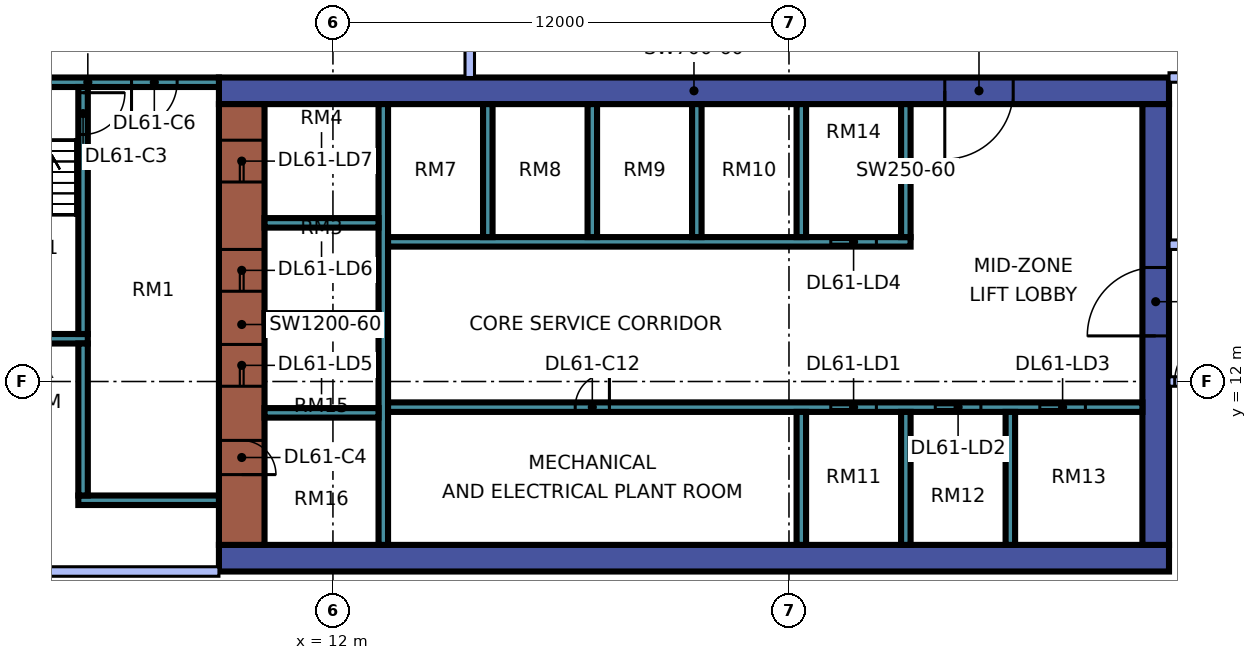
"""IFC4 building model, lengths in metres.
Left out: names, types, materials, properties, quantities, classifications, styles, units other than length and angle.
Written with IfcOpenShell. Run it as: python <this file> out.ifc"""

import sys

from ifc_helpers import new_model, si_unit, direction, frame, frame_2d, origin, place, context, subcontext, project, spatial, rectangle, extrude, element, fill, save


model = new_model("IFC4")
c1 = context("Model", 3, precision=1e-05, world=origin(), true_north=direction((0.0, 1.0)))
c2 = subcontext(c1, "Body", "Model", "MODEL_VIEW")
j1 = project(units=[si_unit("LENGTHUNIT", "METRE"), si_unit("PLANEANGLEUNIT", "RADIAN")], contexts=[c1])
p1 = place(None, origin())
s1 = spatial("IfcSite", under=j1, at=p1, CompositionType="ELEMENT")
p2 = place(p1, origin())
s2 = spatial("IfcBuilding", under=s1, at=p2, CompositionType="ELEMENT")
p3 = place(p2, frame((0.0, 0.0, 256.65)))
s3 = spatial("IfcBuildingStorey", under=s2, at=p3, CompositionType="ELEMENT", Elevation=256.65)
p4 = place(p3, frame((9.0, 7.35, 0.0), z_axis=(0.0, 0.0, 1.0), x_axis=(1.0, 0.0, 0.0)))
e1 = element("IfcWall", 1, at=p4, inside=s3, PredefinedType="SHEAR", context=c2, shape_type="SweptSolid", body=[
    extrude(rectangle(XDim=25.0, YDim=0.7, at=frame_2d((12.5, 0.0))), origin(), (0.0, 0.0, 1.0), 5.5),
])
p5 = place(p3, frame((9.0, 19.65, 0.0), z_axis=(0.0, 0.0, 1.0), x_axis=(1.0, 0.0, 0.0)))
e2 = element("IfcWall", 2, at=p5, inside=s3, PredefinedType="SHEAR", context=c2, shape_type="SweptSolid", body=[
    extrude(rectangle(XDim=25.0, YDim=0.7, at=frame_2d((12.5, 0.0))), origin(), (0.0, 0.0, 1.0), 5.5),
])
p6 = place(p5, frame((19.1, 0.0, 0.0)))
e3 = element("IfcOpeningElement", 3, at=p6, cuts=e2, PredefinedType="OPENING", context=c2, shape_type="SweptSolid", body=[
    extrude(rectangle(XDim=1.8, YDim=2.4, at=frame_2d((0.9, 1.2))), frame((0.0, 0.36, 0.0), z_axis=(0.0, -1.0, 0.0), x_axis=(1.0, 0.0, 0.0)), (0.0, 0.0, 1.0), 0.72),
])
p7 = place(p3, frame((9.6, 7.7, 0.0), z_axis=(0.0, 0.0, 1.0), x_axis=(0.0, 1.0, 0.0)))
e4 = element("IfcWall", 4, at=p7, inside=s3, PredefinedType="SHEAR", context=c2, shape_type="SweptSolid", body=[
    extrude(rectangle(XDim=11.6, YDim=1.2, at=frame_2d((5.8, 0.0))), origin(), (0.0, 0.0, 1.0), 5.5),
])
p8 = place(p7, frame((4.175, 0.0, 0.0)))
e5 = element("IfcOpeningElement", 5, at=p8, cuts=e4, PredefinedType="OPENING", context=c2, shape_type="SweptSolid", body=[
    extrude(rectangle(XDim=1.1, YDim=2.2, at=frame_2d((0.55, 1.1))), frame((0.0, 0.61, 0.0), z_axis=(0.0, -1.0, 0.0), x_axis=(1.0, 0.0, 0.0)), (0.0, 0.0, 1.0), 1.22),
])
p9 = place(p7, frame((6.675, 0.0, 0.0)))
e6 = element("IfcOpeningElement", 6, at=p9, cuts=e4, PredefinedType="OPENING", context=c2, shape_type="SweptSolid", body=[
    extrude(rectangle(XDim=1.1, YDim=2.2, at=frame_2d((0.55, 1.1))), frame((0.0, 0.61, 0.0), z_axis=(0.0, -1.0, 0.0), x_axis=(1.0, 0.0, 0.0)), (0.0, 0.0, 1.0), 1.22),
])
p10 = place(p7, frame((9.55, 0.0, 0.0)))
e7 = element("IfcOpeningElement", 7, at=p10, cuts=e4, PredefinedType="OPENING", context=c2, shape_type="SweptSolid", body=[
    extrude(rectangle(XDim=1.1, YDim=2.2, at=frame_2d((0.55, 1.1))), frame((0.0, 0.61, 0.0), z_axis=(0.0, -1.0, 0.0), x_axis=(1.0, 0.0, 0.0)), (0.0, 0.0, 1.0), 1.22),
])
p11 = place(p7, frame((1.85, 0.0, 0.0)))
e8 = element("IfcOpeningElement", 8, at=p11, cuts=e4, PredefinedType="OPENING", context=c2, shape_type="SweptSolid", body=[
    extrude(rectangle(XDim=0.9, YDim=2.1, at=frame_2d((0.45, 1.05))), frame((0.0, 0.61, 0.0), z_axis=(0.0, -1.0, 0.0), x_axis=(1.0, 0.0, 0.0)), (0.0, 0.0, 1.0), 1.22),
])
p12 = place(p3, frame((33.65, 7.7, 0.0), z_axis=(0.0, 0.0, 1.0), x_axis=(0.0, 1.0, 0.0)))
e9 = element("IfcWall", 9, at=p12, inside=s3, PredefinedType="SHEAR", context=c2, shape_type="SweptSolid", body=[
    extrude(rectangle(XDim=11.6, YDim=0.7, at=frame_2d((5.8, 0.0))), origin(), (0.0, 0.0, 1.0), 5.5),
])
p13 = place(p12, frame((5.5, 0.0, 0.0)))
e10 = element("IfcOpeningElement", 10, at=p13, cuts=e9, PredefinedType="OPENING", context=c2, shape_type="SweptSolid", body=[
    extrude(rectangle(XDim=1.8, YDim=2.4, at=frame_2d((0.9, 1.2))), frame((0.0, 0.36, 0.0), z_axis=(0.0, -1.0, 0.0), x_axis=(1.0, 0.0, 0.0)), (0.0, 0.0, 1.0), 0.72),
])
p14 = place(p3, frame((13.325, 7.7, 0.0), z_axis=(0.0, 0.0, 1.0), x_axis=(0.0, 1.0, 0.0)))
e11 = element("IfcWall", 11, at=p14, inside=s3, PredefinedType="SHEAR", context=c2, shape_type="SweptSolid", body=[
    extrude(rectangle(XDim=11.6, YDim=0.25, at=frame_2d((5.8, 0.0))), origin(), (0.0, 0.0, 1.0), 5.5),
])
p15 = place(p3, frame((13.45, 11.325, 0.0), z_axis=(0.0, 0.0, 1.0), x_axis=(1.0, 0.0, 0.0)))
e12 = element("IfcWall", 12, at=p15, inside=s3, PredefinedType="SHEAR", context=c2, shape_type="SweptSolid", body=[
    extrude(rectangle(XDim=19.85, YDim=0.25, at=frame_2d((9.925, 0.0))), origin(), (0.0, 0.0, 1.0), 5.5),
])
p16 = place(p15, frame((11.65, 0.0, 0.0)))
e13 = element("IfcOpeningElement", 13, at=p16, cuts=e12, PredefinedType="OPENING", context=c2, shape_type="SweptSolid", body=[
    extrude(rectangle(XDim=1.2, YDim=2.2, at=frame_2d((0.6, 1.1))), frame((0.0, 0.135, 0.0), z_axis=(0.0, -1.0, 0.0), x_axis=(1.0, 0.0, 0.0)), (0.0, 0.0, 1.0), 0.27),
])
p17 = place(p15, frame((14.4, 0.0, 0.0)))
e14 = element("IfcOpeningElement", 14, at=p17, cuts=e12, PredefinedType="OPENING", context=c2, shape_type="SweptSolid", body=[
    extrude(rectangle(XDim=1.2, YDim=2.2, at=frame_2d((0.6, 1.1))), frame((0.0, 0.135, 0.0), z_axis=(0.0, -1.0, 0.0), x_axis=(1.0, 0.0, 0.0)), (0.0, 0.0, 1.0), 0.27),
])
p18 = place(p15, frame((17.15, 0.0, 0.0)))
e15 = element("IfcOpeningElement", 15, at=p18, cuts=e12, PredefinedType="OPENING", context=c2, shape_type="SweptSolid", body=[
    extrude(rectangle(XDim=1.2, YDim=2.2, at=frame_2d((0.6, 1.1))), frame((0.0, 0.135, 0.0), z_axis=(0.0, -1.0, 0.0), x_axis=(1.0, 0.0, 0.0)), (0.0, 0.0, 1.0), 0.27),
])
p19 = place(p15, frame((4.925, 0.0, 0.0)))
e16 = element("IfcOpeningElement", 16, at=p19, cuts=e12, PredefinedType="OPENING", context=c2, shape_type="SweptSolid", body=[
    extrude(rectangle(XDim=0.9, YDim=2.1, at=frame_2d((0.45, 1.05))), frame((0.0, 0.135, 0.0), z_axis=(0.0, -1.0, 0.0), x_axis=(1.0, 0.0, 0.0)), (0.0, 0.0, 1.0), 0.27),
])
p20 = place(p3, frame((13.45, 15.675, 0.0), z_axis=(0.0, 0.0, 1.0), x_axis=(1.0, 0.0, 0.0)))
e17 = element("IfcWall", 17, at=p20, inside=s3, PredefinedType="SHEAR", context=c2, shape_type="SweptSolid", body=[
    extrude(rectangle(XDim=13.75, YDim=0.25, at=frame_2d((6.875, 0.0))), origin(), (0.0, 0.0, 1.0), 5.5),
])
p21 = place(p20, frame((11.65, 0.0, 0.0)))
e18 = element("IfcOpeningElement", 18, at=p21, cuts=e17, PredefinedType="OPENING", context=c2, shape_type="SweptSolid", body=[
    extrude(rectangle(XDim=1.2, YDim=2.2, at=frame_2d((0.6, 1.1))), frame((0.0, 0.135, 0.0), z_axis=(0.0, -1.0, 0.0), x_axis=(1.0, 0.0, 0.0)), (0.0, 0.0, 1.0), 0.27),
])
for number, where, z_axis, x_axis in (
    (19, (10.2, 11.175, 0.0), (0.0, 0.0, 1.0), (1.0, 0.0, 0.0)),
    (20, (10.2, 13.675, 0.0), (0.0, 0.0, 1.0), (1.0, 0.0, 0.0)),
    (21, (10.2, 16.175, 0.0), (0.0, 0.0, 1.0), (1.0, 0.0, 0.0)),
):
    element("IfcWall", number, at=place(p3, frame(where, z_axis=z_axis, x_axis=x_axis)), inside=s3, PredefinedType="SHEAR", context=c2, shape_type="SweptSolid", body=[
        extrude(rectangle(XDim=3.0, YDim=0.25, at=frame_2d((1.5, 0.0))), origin(), (0.0, 0.0, 1.0), 5.5),
    ])
for number, where, z_axis, x_axis in (
    (22, (24.325, 7.7, 0.0), (0.0, 0.0, 1.0), (0.0, 1.0, 0.0)),
    (23, (27.075, 7.7, 0.0), (0.0, 0.0, 1.0), (0.0, 1.0, 0.0)),
    (24, (29.825, 7.7, 0.0), (0.0, 0.0, 1.0), (0.0, 1.0, 0.0)),
    (25, (16.075, 15.8, 0.0), (0.0, 0.0, 1.0), (0.0, 1.0, 0.0)),
    (26, (18.825, 15.8, 0.0), (0.0, 0.0, 1.0), (0.0, 1.0, 0.0)),
    (27, (21.575, 15.8, 0.0), (0.0, 0.0, 1.0), (0.0, 1.0, 0.0)),
    (28, (24.325, 15.8, 0.0), (0.0, 0.0, 1.0), (0.0, 1.0, 0.0)),
    (29, (27.075, 15.8, 0.0), (0.0, 0.0, 1.0), (0.0, 1.0, 0.0)),
):
    element("IfcWall", number, at=place(p3, frame(where, z_axis=z_axis, x_axis=x_axis)), inside=s3, PredefinedType="SHEAR", context=c2, shape_type="SweptSolid", body=[
        extrude(rectangle(XDim=3.5, YDim=0.25, at=frame_2d((1.75, 0.0))), origin(), (0.0, 0.0, 1.0), 5.5),
    ])
p22 = place(p3, frame((2.1, 19.875, 0.0), z_axis=(0.0, 0.0, 1.0), x_axis=(1.0, 0.0, 0.0)))
e30 = element("IfcWall", 30, at=p22, inside=s3, PredefinedType="SHEAR", context=c2, shape_type="SweptSolid", body=[
    extrude(rectangle(XDim=6.9, YDim=0.25, at=frame_2d((3.45, 0.0))), origin(), (0.0, 0.0, 1.0), 5.5),
])
p23 = place(p22, frame((1.175, 0.0, 0.0)))
e31 = element("IfcOpeningElement", 31, at=p23, cuts=e30, PredefinedType="OPENING", context=c2, shape_type="SweptSolid", body=[
    extrude(rectangle(XDim=1.1, YDim=2.2, at=frame_2d((0.55, 1.1))), frame((0.0, 0.135, 0.0), z_axis=(0.0, -1.0, 0.0), x_axis=(1.0, 0.0, 0.0)), (0.0, 0.0, 1.0), 0.27),
])
p24 = place(p22, frame((4.6, 0.0, 0.0)))
e32 = element("IfcOpeningElement", 32, at=p24, cuts=e30, PredefinedType="OPENING", context=c2, shape_type="SweptSolid", body=[
    extrude(rectangle(XDim=1.2, YDim=2.2, at=frame_2d((0.6, 1.1))), frame((0.0, 0.135, 0.0), z_axis=(0.0, -1.0, 0.0), x_axis=(1.0, 0.0, 0.0)), (0.0, 0.0, 1.0), 0.27),
])
p25 = place(p3, frame((2.1, 13.125, 0.0), z_axis=(0.0, 0.0, 1.0), x_axis=(1.0, 0.0, 0.0)))
e33 = element("IfcWall", 33, at=p25, inside=s3, PredefinedType="SHEAR", context=c2, shape_type="SweptSolid", body=[
    extrude(rectangle(XDim=3.45, YDim=0.25, at=frame_2d((1.725, 0.0))), origin(), (0.0, 0.0, 1.0), 5.5),
])
p26 = place(p3, frame((5.425, 13.25, 0.0), z_axis=(0.0, 0.0, 1.0), x_axis=(0.0, 1.0, 0.0)))
e34 = element("IfcWall", 34, at=p26, inside=s3, PredefinedType="SHEAR", context=c2, shape_type="SweptSolid", body=[
    extrude(rectangle(XDim=6.5, YDim=0.25, at=frame_2d((3.25, 0.0))), origin(), (0.0, 0.0, 1.0), 5.5),
])
p27 = place(p26, frame((5.25, 0.0, 0.0)))
e35 = element("IfcOpeningElement", 35, at=p27, cuts=e34, PredefinedType="OPENING", context=c2, shape_type="SweptSolid", body=[
    extrude(rectangle(XDim=1.1, YDim=2.2, at=frame_2d((0.55, 1.1))), frame((0.0, 0.135, 0.0), z_axis=(0.0, -1.0, 0.0), x_axis=(1.0, 0.0, 0.0)), (0.0, 0.0, 1.0), 0.27),
])
p28 = place(p3, frame((5.3, 8.875, 0.0), z_axis=(0.0, 0.0, 1.0), x_axis=(1.0, 0.0, 0.0)))
e36 = element("IfcWall", 36, at=p28, inside=s3, PredefinedType="SHEAR", context=c2, shape_type="SweptSolid", body=[
    extrude(rectangle(XDim=3.7, YDim=0.25, at=frame_2d((1.85, 0.0))), origin(), (0.0, 0.0, 1.0), 5.5),
])
p29 = place(p3, frame((5.425, 9.0, 0.0), z_axis=(0.0, 0.0, 1.0), x_axis=(0.0, 1.0, 0.0)))
e37 = element("IfcWall", 37, at=p29, inside=s3, PredefinedType="SHEAR", context=c2, shape_type="SweptSolid", body=[
    extrude(rectangle(XDim=4.0, YDim=0.25, at=frame_2d((2.0, 0.0))), origin(), (0.0, 0.0, 1.0), 5.5),
])
p30 = place(p3, frame((-1.447, 12.553, 0.0), z_axis=(0.0, 0.0, 1.0), x_axis=(0.707106781187, -0.707106781187, 0.0)))
e38 = element("IfcWall", 38, at=p30, inside=s3, PredefinedType="SOLIDWALL", context=c2, shape_type="SweptSolid", body=[
    extrude(rectangle(XDim=19.799, YDim=0.15, at=frame_2d((9.899, 0.0))), origin(), (0.0, 0.0, 1.0), 5.05),
])
p31 = place(p30, frame((11.453, 0.0, 0.45)))
e39 = element("IfcOpeningElement", 39, at=p31, cuts=e38, PredefinedType="OPENING", context=c2, shape_type="SweptSolid", body=[
    extrude(rectangle(XDim=3.0, YDim=3.6, at=frame_2d((1.5, 1.8))), frame((0.0, 0.085, 0.0), z_axis=(0.0, -1.0, 0.0), x_axis=(1.0, 0.0, 0.0)), (0.0, 0.0, 1.0), 0.17),
])
p32 = place(p3, frame((4.211, 7.0, 0.0), z_axis=(0.0, 0.0, 1.0), x_axis=(1.0, 0.0, 0.0)))
e40 = element("IfcWall", 40, at=p32, inside=s3, PredefinedType="PARTITIONING", context=c2, shape_type="SweptSolid", body=[
    extrude(rectangle(XDim=4.789, YDim=0.25, at=frame_2d((2.395, 0.0))), origin(), (0.0, 0.0, 1.0), 5.05),
])
p33 = place(p3, frame((15.6, 20.0, 0.0), z_axis=(0.0, 0.0, 1.0), x_axis=(0.0, 1.0, 0.0)))
e41 = element("IfcWall", 41, at=p33, inside=s3, PredefinedType="PARTITIONING", context=c2, shape_type="SweptSolid", body=[
    extrude(rectangle(XDim=27.775, YDim=0.25, at=frame_2d((13.887, 0.0))), origin(), (0.0, 0.0, 1.0), 5.05),
])
p34 = place(p33, frame((19.15, 0.0, 0.0)))
e42 = element("IfcOpeningElement", 42, at=p34, cuts=e41, PredefinedType="OPENING", context=c2, shape_type="SweptSolid", body=[
    extrude(rectangle(XDim=1.8, YDim=2.1, at=frame_2d((0.9, 1.05))), frame((0.0, 0.135, 0.0), z_axis=(0.0, -1.0, 0.0), x_axis=(1.0, 0.0, 0.0)), (0.0, 0.0, 1.0), 0.27),
])
p35 = place(p33, frame((24.9, 0.0, 0.0)))
e43 = element("IfcOpeningElement", 43, at=p35, cuts=e41, PredefinedType="OPENING", context=c2, shape_type="SweptSolid", body=[
    extrude(rectangle(XDim=1.8, YDim=2.1, at=frame_2d((0.9, 1.05))), frame((0.0, 0.135, 0.0), z_axis=(0.0, -1.0, 0.0), x_axis=(1.0, 0.0, 0.0)), (0.0, 0.0, 1.0), 0.27),
])
p36 = place(p33, frame((14.65, 0.0, 0.0)))
e44 = element("IfcOpeningElement", 44, at=p36, cuts=e41, PredefinedType="OPENING", context=c2, shape_type="SweptSolid", body=[
    extrude(rectangle(XDim=0.9, YDim=2.1, at=frame_2d((0.45, 1.05))), frame((0.0, 0.135, 0.0), z_axis=(0.0, -1.0, 0.0), x_axis=(1.0, 0.0, 0.0)), (0.0, 0.0, 1.0), 0.27),
])
p37 = place(p33, frame((11.4, 0.0, 0.0)))
e45 = element("IfcOpeningElement", 45, at=p37, cuts=e41, PredefinedType="OPENING", context=c2, shape_type="SweptSolid", body=[
    extrude(rectangle(XDim=0.9, YDim=2.1, at=frame_2d((0.45, 1.05))), frame((0.0, 0.135, 0.0), z_axis=(0.0, -1.0, 0.0), x_axis=(1.0, 0.0, 0.0)), (0.0, 0.0, 1.0), 0.27),
])
p38 = place(p3, frame((34.0, 12.0, 0.0), z_axis=(0.0, 0.0, 1.0), x_axis=(1.0, 0.0, 0.0)))
e46 = element("IfcWall", 46, at=p38, inside=s3, PredefinedType="PARTITIONING", context=c2, shape_type="SweptSolid", body=[
    extrude(rectangle(XDim=3.2, YDim=0.25, at=frame_2d((1.6, 0.0))), origin(), (0.0, 0.0, 1.0), 5.05),
])
p39 = place(p38, frame((0.15, 0.0, 0.0)))
e47 = element("IfcOpeningElement", 47, at=p39, cuts=e46, PredefinedType="OPENING", context=c2, shape_type="SweptSolid", body=[
    extrude(rectangle(XDim=1.2, YDim=2.1, at=frame_2d((0.6, 1.05))), frame((0.0, 0.135, 0.0), z_axis=(0.0, -1.0, 0.0), x_axis=(1.0, 0.0, 0.0)), (0.0, 0.0, 1.0), 0.27),
])
p40 = place(p3, frame((34.0, 15.6, 0.0), z_axis=(0.0, 0.0, 1.0), x_axis=(1.0, 0.0, 0.0)))
e48 = element("IfcWall", 48, at=p40, inside=s3, PredefinedType="PARTITIONING", context=c2, shape_type="SweptSolid", body=[
    extrude(rectangle(XDim=8.125, YDim=0.25, at=frame_2d((4.062, 0.0))), origin(), (0.0, 0.0, 1.0), 5.05),
])
p41 = place(p40, frame((3.05, 0.0, 0.0)))
e49 = element("IfcOpeningElement", 49, at=p41, cuts=e48, PredefinedType="OPENING", context=c2, shape_type="SweptSolid", body=[
    extrude(rectangle(XDim=1.8, YDim=2.1, at=frame_2d((0.9, 1.05))), frame((0.0, 0.135, 0.0), z_axis=(0.0, -1.0, 0.0), x_axis=(1.0, 0.0, 0.0)), (0.0, 0.0, 1.0), 0.27),
])
p42 = place(p3, frame((34.0, 20.0, 0.0), z_axis=(0.0, 0.0, 1.0), x_axis=(1.0, 0.0, 0.0)))
e50 = element("IfcWall", 50, at=p42, inside=s3, PredefinedType="PARTITIONING", context=c2, shape_type="SweptSolid", body=[
    extrude(rectangle(XDim=1.875, YDim=0.25, at=frame_2d((0.938, 0.0))), origin(), (0.0, 0.0, 1.0), 5.05),
])
p43 = place(p16, origin())
e51 = element("IfcDoor", 51, at=p43, inside=s3, OperationType="DOUBLE_DOOR_SLIDING", PredefinedType="DOOR", context=c2, shape_type="SweptSolid", body=[
    extrude(rectangle(XDim=1.2, YDim=2.2, at=frame_2d((0.6, 1.1))), frame((0.0, 0.025, 0.0), z_axis=(0.0, -1.0, 0.0), x_axis=(1.0, 0.0, 0.0)), (0.0, 0.0, 1.0), 0.05),
])
fill(e13, e51)
p44 = place(p17, origin())
e52 = element("IfcDoor", 52, at=p44, inside=s3, OperationType="DOUBLE_DOOR_SLIDING", PredefinedType="DOOR", context=c2, shape_type="SweptSolid", body=[
    extrude(rectangle(XDim=1.2, YDim=2.2, at=frame_2d((0.6, 1.1))), frame((0.0, 0.025, 0.0), z_axis=(0.0, -1.0, 0.0), x_axis=(1.0, 0.0, 0.0)), (0.0, 0.0, 1.0), 0.05),
])
fill(e14, e52)
p45 = place(p18, origin())
e53 = element("IfcDoor", 53, at=p45, inside=s3, OperationType="DOUBLE_DOOR_SLIDING", PredefinedType="DOOR", context=c2, shape_type="SweptSolid", body=[
    extrude(rectangle(XDim=1.2, YDim=2.2, at=frame_2d((0.6, 1.1))), frame((0.0, 0.025, 0.0), z_axis=(0.0, -1.0, 0.0), x_axis=(1.0, 0.0, 0.0)), (0.0, 0.0, 1.0), 0.05),
])
fill(e15, e53)
p46 = place(p21, origin())
e54 = element("IfcDoor", 54, at=p46, inside=s3, OperationType="DOUBLE_DOOR_SLIDING", PredefinedType="DOOR", context=c2, shape_type="SweptSolid", body=[
    extrude(rectangle(XDim=1.2, YDim=2.2, at=frame_2d((0.6, 1.1))), frame((0.0, 0.025, 0.0), z_axis=(0.0, -1.0, 0.0), x_axis=(1.0, 0.0, 0.0)), (0.0, 0.0, 1.0), 0.05),
])
fill(e18, e54)
p47 = place(p8, origin())
e55 = element("IfcDoor", 55, at=p47, inside=s3, OperationType="DOUBLE_DOOR_SLIDING", PredefinedType="DOOR", context=c2, shape_type="SweptSolid", body=[
    extrude(rectangle(XDim=1.1, YDim=2.2, at=frame_2d((0.55, 1.1))), frame((0.0, 0.025, 0.0), z_axis=(0.0, -1.0, 0.0), x_axis=(1.0, 0.0, 0.0)), (0.0, 0.0, 1.0), 0.05),
])
fill(e5, e55)
p48 = place(p9, origin())
e56 = element("IfcDoor", 56, at=p48, inside=s3, OperationType="DOUBLE_DOOR_SLIDING", PredefinedType="DOOR", context=c2, shape_type="SweptSolid", body=[
    extrude(rectangle(XDim=1.1, YDim=2.2, at=frame_2d((0.55, 1.1))), frame((0.0, 0.025, 0.0), z_axis=(0.0, -1.0, 0.0), x_axis=(1.0, 0.0, 0.0)), (0.0, 0.0, 1.0), 0.05),
])
fill(e6, e56)
p49 = place(p10, origin())
e57 = element("IfcDoor", 57, at=p49, inside=s3, OperationType="DOUBLE_DOOR_SLIDING", PredefinedType="DOOR", context=c2, shape_type="SweptSolid", body=[
    extrude(rectangle(XDim=1.1, YDim=2.2, at=frame_2d((0.55, 1.1))), frame((0.0, 0.025, 0.0), z_axis=(0.0, -1.0, 0.0), x_axis=(1.0, 0.0, 0.0)), (0.0, 0.0, 1.0), 0.05),
])
fill(e7, e57)
p50 = place(p13, origin())
e58 = element("IfcDoor", 58, at=p50, inside=s3, OperationType="DOUBLE_DOOR_SINGLE_SWING", PredefinedType="DOOR", context=c2, shape_type="SweptSolid", body=[
    extrude(rectangle(XDim=1.8, YDim=2.4, at=frame_2d((0.9, 1.2))), frame((0.0, 0.025, 0.0), z_axis=(0.0, -1.0, 0.0), x_axis=(1.0, 0.0, 0.0)), (0.0, 0.0, 1.0), 0.05),
])
fill(e10, e58)
p51 = place(p6, frame((1.8, 0.0, 0.0), z_axis=(0.0, 0.0, 1.0), x_axis=(-1.0, 0.0, 0.0)))
e59 = element("IfcDoor", 59, at=p51, inside=s3, OperationType="DOUBLE_DOOR_SINGLE_SWING", PredefinedType="DOOR", context=c2, shape_type="SweptSolid", body=[
    extrude(rectangle(XDim=1.8, YDim=2.4, at=frame_2d((0.9, 1.2))), frame((0.0, 0.025, 0.0), z_axis=(0.0, -1.0, 0.0), x_axis=(1.0, 0.0, 0.0)), (0.0, 0.0, 1.0), 0.05),
])
fill(e3, e59)
p52 = place(p27, origin())
e60 = element("IfcDoor", 60, at=p52, inside=s3, OperationType="SINGLE_SWING_RIGHT", PredefinedType="DOOR", context=c2, shape_type="SweptSolid", body=[
    extrude(rectangle(XDim=1.1, YDim=2.2, at=frame_2d((0.55, 1.1))), frame((0.0, 0.025, 0.0), z_axis=(0.0, -1.0, 0.0), x_axis=(1.0, 0.0, 0.0)), (0.0, 0.0, 1.0), 0.05),
])
fill(e35, e60)
p53 = place(p11, frame((0.9, 0.0, 0.0), z_axis=(0.0, 0.0, 1.0), x_axis=(-1.0, 0.0, 0.0)))
e61 = element("IfcDoor", 61, at=p53, inside=s3, OperationType="SINGLE_SWING_LEFT", PredefinedType="DOOR", context=c2, shape_type="SweptSolid", body=[
    extrude(rectangle(XDim=0.9, YDim=2.1, at=frame_2d((0.45, 1.05))), frame((0.0, 0.025, 0.0), z_axis=(0.0, -1.0, 0.0), x_axis=(1.0, 0.0, 0.0)), (0.0, 0.0, 1.0), 0.05),
])
fill(e8, e61)
p54 = place(p24, frame((1.2, 0.0, 0.0), z_axis=(0.0, 0.0, 1.0), x_axis=(-1.0, 0.0, 0.0)))
e62 = element("IfcDoor", 62, at=p54, inside=s3, OperationType="SINGLE_SWING_LEFT", PredefinedType="DOOR", context=c2, shape_type="SweptSolid", body=[
    extrude(rectangle(XDim=1.2, YDim=2.2, at=frame_2d((0.6, 1.1))), frame((0.0, 0.025, 0.0), z_axis=(0.0, -1.0, 0.0), x_axis=(1.0, 0.0, 0.0)), (0.0, 0.0, 1.0), 0.05),
])
fill(e32, e62)
p55 = place(p19, frame((0.9, 0.0, 0.0), z_axis=(0.0, 0.0, 1.0), x_axis=(-1.0, 0.0, 0.0)))
e63 = element("IfcDoor", 63, at=p55, inside=s3, OperationType="SINGLE_SWING_RIGHT", PredefinedType="DOOR", context=c2, shape_type="SweptSolid", body=[
    extrude(rectangle(XDim=0.9, YDim=2.1, at=frame_2d((0.45, 1.05))), frame((0.0, 0.025, 0.0), z_axis=(0.0, -1.0, 0.0), x_axis=(1.0, 0.0, 0.0)), (0.0, 0.0, 1.0), 0.05),
])
fill(e16, e63)
p56 = place(p39, frame((1.2, 0.0, 0.0), z_axis=(0.0, 0.0, 1.0), x_axis=(-1.0, 0.0, 0.0)))
e64 = element("IfcDoor", 64, at=p56, inside=s3, OperationType="SINGLE_SWING_RIGHT", PredefinedType="DOOR", context=c2, shape_type="SweptSolid", body=[
    extrude(rectangle(XDim=1.2, YDim=2.1, at=frame_2d((0.6, 1.05))), frame((0.0, 0.025, 0.0), z_axis=(0.0, -1.0, 0.0), x_axis=(1.0, 0.0, 0.0)), (0.0, 0.0, 1.0), 0.05),
])
fill(e47, e64)
save(model, sys.argv[1])
